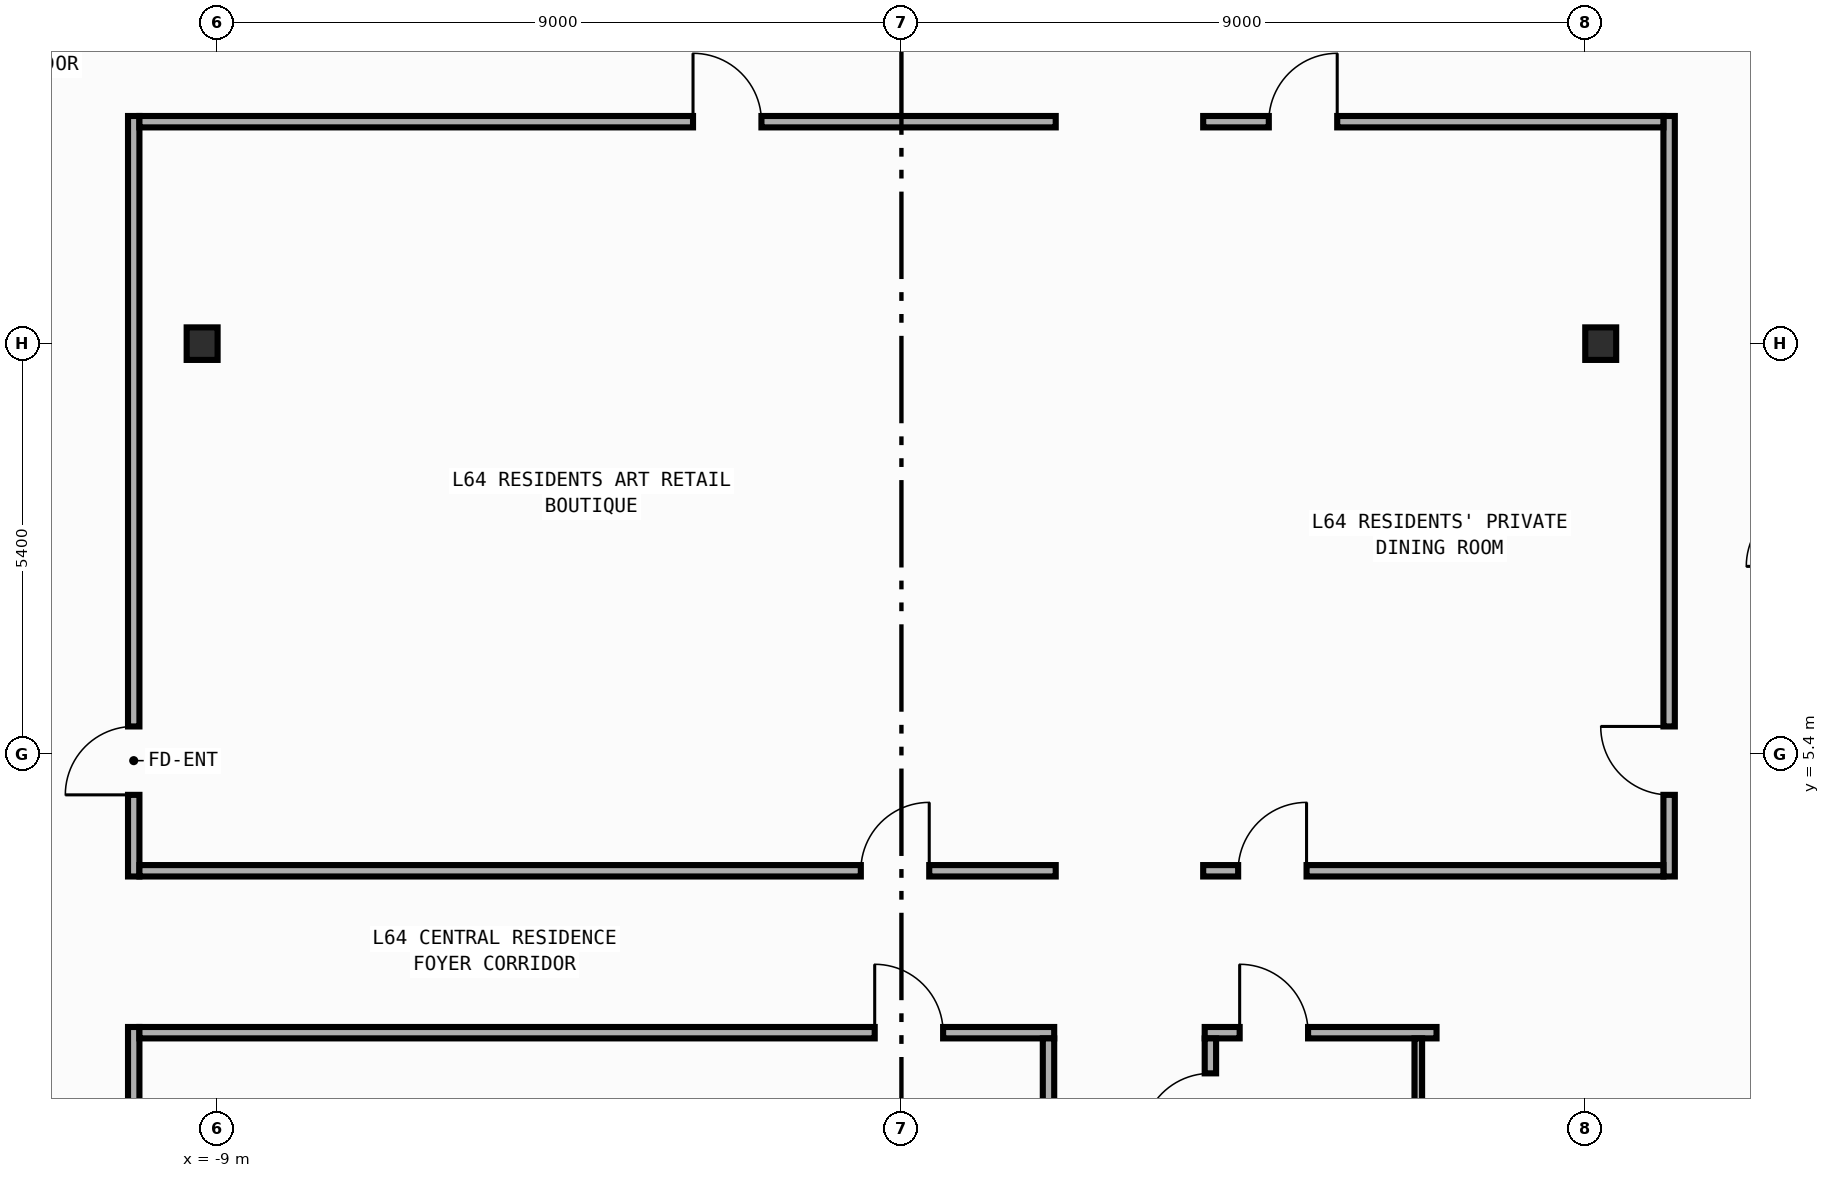
"""IFC4 building model, lengths in metres.
Left out: names, types, materials, properties, quantities, classifications, styles, units other than length and angle.
Written with IfcOpenShell. Run it as: python <this file> out.ifc"""

import sys

from ifc_helpers import new_model, si_unit, direction, frame, frame_2d, origin, origin_2d, place, context, subcontext, project, spatial, rectangle, i_section, extrude, element, fill, save


model = new_model("IFC4")
c1 = context("Model", 3, precision=1e-05, world=origin(), true_north=direction((0.0, 1.0)))
c2 = subcontext(c1, "Body", "Model", "MODEL_VIEW")
j1 = project(units=[si_unit("LENGTHUNIT", "METRE"), si_unit("PLANEANGLEUNIT", "RADIAN")], contexts=[c1])
p1 = place(None, origin())
s1 = spatial("IfcSite", under=j1, at=p1, CompositionType="ELEMENT")
p2 = place(p1, origin())
s2 = spatial("IfcBuilding", under=s1, at=p2, CompositionType="ELEMENT")
p3 = place(p2, frame((0.0, 0.0, 269.2)))
s3 = spatial("IfcBuildingStorey", under=s2, at=p3, CompositionType="ELEMENT", Elevation=269.2)
for number, where, z_axis, x_axis in (
    (1, (-9.2, 10.8, 0.0), (0.0, 0.0, 1.0), (1.0, 0.0, 0.0)),
    (2, (9.2, 10.8, 0.0), (0.0, 0.0, 1.0), (1.0, 0.0, 0.0)),
):
    element("IfcColumn", number, at=place(p3, frame(where, z_axis=z_axis, x_axis=x_axis)), inside=s3, PredefinedType="COLUMN", context=c2, shape_type="SweptSolid", body=[
        extrude(i_section(OverallWidth=0.407, OverallDepth=0.428, WebThickness=0.02, FlangeThickness=0.035, FilletRadius=0.022, at=origin_2d()), origin(), (0.0, 0.0, 1.0), 3.6),
    ])
p4 = place(p3, frame((-10.1, 3.79, 0.0), z_axis=(0.0, 0.0, 1.0), x_axis=(0.0, 1.0, 0.0)))
e3 = element("IfcWall", 3, at=p4, inside=s3, PredefinedType="PARTITIONING", context=c2, shape_type="SweptSolid", body=[
    extrude(rectangle(XDim=10.005, YDim=0.15, at=frame_2d((5.002, 0.0))), origin(), (0.0, 0.0, 1.0), 3.25),
])
p5 = place(p4, frame((1.074, 0.0, 0.0)))
e4 = element("IfcOpeningElement", 4, at=p5, cuts=e3, PredefinedType="OPENING", context=c2, shape_type="SweptSolid", body=[
    extrude(rectangle(XDim=0.9, YDim=2.15, at=frame_2d((0.45, 1.075))), frame((0.0, 0.085, 0.0), z_axis=(0.0, -1.0, 0.0), x_axis=(1.0, 0.0, 0.0)), (0.0, 0.0, 1.0), 0.17),
])
p6 = place(p3, frame((-10.1, -13.795, 0.0), z_axis=(0.0, 0.0, 1.0), x_axis=(0.0, 1.0, 0.0)))
e5 = element("IfcWall", 5, at=p6, inside=s3, PredefinedType="PARTITIONING", context=c2, shape_type="SweptSolid", body=[
    extrude(rectangle(XDim=15.605, YDim=0.15, at=frame_2d((7.802, 0.0))), origin(), (0.0, 0.0, 1.0), 3.25),
])
p7 = place(p6, frame((7.961, 0.0, 0.0)))
e6 = element("IfcOpeningElement", 6, at=p7, cuts=e5, PredefinedType="OPENING", context=c2, shape_type="SweptSolid", body=[
    extrude(rectangle(XDim=0.9, YDim=2.15, at=frame_2d((0.45, 1.075))), frame((0.0, 0.085, 0.0), z_axis=(0.0, -1.0, 0.0), x_axis=(1.0, 0.0, 0.0)), (0.0, 0.0, 1.0), 0.17),
])
p8 = place(p3, frame((10.1, 3.79, 0.0), z_axis=(0.0, 0.0, 1.0), x_axis=(0.0, 1.0, 0.0)))
e7 = element("IfcWall", 7, at=p8, inside=s3, PredefinedType="PARTITIONING", context=c2, shape_type="SweptSolid", body=[
    extrude(rectangle(XDim=10.005, YDim=0.15, at=frame_2d((5.002, 0.0))), origin(), (0.0, 0.0, 1.0), 3.25),
])
p9 = place(p8, frame((1.074, 0.0, 0.0)))
e8 = element("IfcOpeningElement", 8, at=p9, cuts=e7, PredefinedType="OPENING", context=c2, shape_type="SweptSolid", body=[
    extrude(rectangle(XDim=0.9, YDim=2.15, at=frame_2d((0.45, 1.075))), frame((0.0, 0.085, 0.0), z_axis=(0.0, -1.0, 0.0), x_axis=(1.0, 0.0, 0.0)), (0.0, 0.0, 1.0), 0.17),
])
p10 = place(p3, frame((-10.025, 3.865, 0.0), z_axis=(0.0, 0.0, 1.0), x_axis=(1.0, 0.0, 0.0)))
e9 = element("IfcWall", 9, at=p10, inside=s3, PredefinedType="PARTITIONING", context=c2, shape_type="SweptSolid", body=[
    extrude(rectangle(XDim=12.055, YDim=0.15, at=frame_2d((6.027, 0.0))), origin(), (0.0, 0.0, 1.0), 3.25),
])
p11 = place(p10, frame((9.491, 0.0, 0.0)))
e10 = element("IfcOpeningElement", 10, at=p11, cuts=e9, PredefinedType="OPENING", context=c2, shape_type="SweptSolid", body=[
    extrude(rectangle(XDim=0.9, YDim=2.15, at=frame_2d((0.45, 1.075))), frame((0.0, 0.085, 0.0), z_axis=(0.0, -1.0, 0.0), x_axis=(1.0, 0.0, 0.0)), (0.0, 0.0, 1.0), 0.17),
])
p12 = place(p3, frame((-10.025, 1.735, 0.0), z_axis=(0.0, 0.0, 1.0), x_axis=(1.0, 0.0, 0.0)))
e11 = element("IfcWall", 11, at=p12, inside=s3, PredefinedType="PARTITIONING", context=c2, shape_type="SweptSolid", body=[
    extrude(rectangle(XDim=12.035, YDim=0.15, at=frame_2d((6.018, 0.0))), origin(), (0.0, 0.0, 1.0), 3.25),
])
p13 = place(p12, frame((9.674, 0.0, 0.0)))
e12 = element("IfcOpeningElement", 12, at=p13, cuts=e11, PredefinedType="OPENING", context=c2, shape_type="SweptSolid", body=[
    extrude(rectangle(XDim=0.9, YDim=2.15, at=frame_2d((0.45, 1.075))), frame((0.0, 0.085, 0.0), z_axis=(0.0, -1.0, 0.0), x_axis=(1.0, 0.0, 0.0)), (0.0, 0.0, 1.0), 0.17),
])
p14 = place(p3, frame((3.97, 3.865, 0.0), z_axis=(0.0, 0.0, 1.0), x_axis=(1.0, 0.0, 0.0)))
e13 = element("IfcWall", 13, at=p14, inside=s3, PredefinedType="PARTITIONING", context=c2, shape_type="SweptSolid", body=[
    extrude(rectangle(XDim=6.055, YDim=0.15, at=frame_2d((3.027, 0.0))), origin(), (0.0, 0.0, 1.0), 3.25),
])
p15 = place(p14, frame((0.46, 0.0, 0.0)))
e14 = element("IfcOpeningElement", 14, at=p15, cuts=e13, PredefinedType="OPENING", context=c2, shape_type="SweptSolid", body=[
    extrude(rectangle(XDim=0.9, YDim=2.15, at=frame_2d((0.45, 1.075))), frame((0.0, 0.085, 0.0), z_axis=(0.0, -1.0, 0.0), x_axis=(1.0, 0.0, 0.0)), (0.0, 0.0, 1.0), 0.17),
])
p16 = place(p3, frame((3.99, 1.735, 0.0), z_axis=(0.0, 0.0, 1.0), x_axis=(1.0, 0.0, 0.0)))
e15 = element("IfcWall", 15, at=p16, inside=s3, PredefinedType="PARTITIONING", context=c2, shape_type="SweptSolid", body=[
    extrude(rectangle(XDim=3.05, YDim=0.15, at=frame_2d((1.525, 0.0))), origin(), (0.0, 0.0, 1.0), 3.25),
])
p17 = place(p16, frame((0.46, 0.0, 0.0)))
e16 = element("IfcOpeningElement", 16, at=p17, cuts=e15, PredefinedType="OPENING", context=c2, shape_type="SweptSolid", body=[
    extrude(rectangle(XDim=0.9, YDim=2.15, at=frame_2d((0.45, 1.075))), frame((0.0, 0.085, 0.0), z_axis=(0.0, -1.0, 0.0), x_axis=(1.0, 0.0, 0.0)), (0.0, 0.0, 1.0), 0.17),
])
p18 = place(p3, frame((1.935, -13.795, 0.0), z_axis=(0.0, 0.0, 1.0), x_axis=(0.0, 1.0, 0.0)))
e17 = element("IfcWall", 17, at=p18, inside=s3, PredefinedType="PARTITIONING", context=c2, shape_type="SweptSolid", body=[
    extrude(rectangle(XDim=15.455, YDim=0.15, at=frame_2d((7.728, 0.0))), origin(), (0.0, 0.0, 1.0), 3.25),
])
p19 = place(p18, frame((7.879, 0.0, 0.0)))
e18 = element("IfcOpeningElement", 18, at=p19, cuts=e17, PredefinedType="OPENING", context=c2, shape_type="SweptSolid", body=[
    extrude(rectangle(XDim=0.9, YDim=2.15, at=frame_2d((0.45, 1.075))), frame((0.0, 0.085, 0.0), z_axis=(0.0, -1.0, 0.0), x_axis=(1.0, 0.0, 0.0)), (0.0, 0.0, 1.0), 0.17),
])
p20 = place(p3, frame((4.065, -0.98, 0.0), z_axis=(0.0, 0.0, 1.0), x_axis=(0.0, 1.0, 0.0)))
e19 = element("IfcWall", 19, at=p20, inside=s3, PredefinedType="PARTITIONING", context=c2, shape_type="SweptSolid", body=[
    extrude(rectangle(XDim=2.64, YDim=0.15, at=frame_2d((1.32, 0.0))), origin(), (0.0, 0.0, 1.0), 3.25),
])
p21 = place(p20, frame((1.28, 0.0, 0.0)))
e20 = element("IfcOpeningElement", 20, at=p21, cuts=e19, PredefinedType="OPENING", context=c2, shape_type="SweptSolid", body=[
    extrude(rectangle(XDim=0.9, YDim=2.15, at=frame_2d((0.45, 1.075))), frame((0.0, 0.085, 0.0), z_axis=(0.0, -1.0, 0.0), x_axis=(1.0, 0.0, 0.0)), (0.0, 0.0, 1.0), 0.17),
])
p22 = place(p3, frame((-10.025, 13.72, 0.0), z_axis=(0.0, 0.0, 1.0), x_axis=(1.0, 0.0, 0.0)))
e21 = element("IfcWall", 21, at=p22, inside=s3, PredefinedType="PARTITIONING", context=c2, shape_type="SweptSolid", body=[
    extrude(rectangle(XDim=12.055, YDim=0.15, at=frame_2d((6.027, 0.0))), origin(), (0.0, 0.0, 1.0), 3.25),
])
p23 = place(p22, frame((7.283, 0.0, 0.0)))
e22 = element("IfcOpeningElement", 22, at=p23, cuts=e21, PredefinedType="OPENING", context=c2, shape_type="SweptSolid", body=[
    extrude(rectangle(XDim=0.9, YDim=2.15, at=frame_2d((0.45, 1.075))), frame((0.0, 0.085, 0.0), z_axis=(0.0, -1.0, 0.0), x_axis=(1.0, 0.0, 0.0)), (0.0, 0.0, 1.0), 0.17),
])
p24 = place(p3, frame((3.97, 13.72, 0.0), z_axis=(0.0, 0.0, 1.0), x_axis=(1.0, 0.0, 0.0)))
e23 = element("IfcWall", 23, at=p24, inside=s3, PredefinedType="PARTITIONING", context=c2, shape_type="SweptSolid", body=[
    extrude(rectangle(XDim=6.055, YDim=0.15, at=frame_2d((3.027, 0.0))), origin(), (0.0, 0.0, 1.0), 3.25),
])
p25 = place(p24, frame((0.863, 0.0, 0.0)))
e24 = element("IfcOpeningElement", 24, at=p25, cuts=e23, PredefinedType="OPENING", context=c2, shape_type="SweptSolid", body=[
    extrude(rectangle(XDim=0.9, YDim=2.15, at=frame_2d((0.45, 1.075))), frame((0.0, 0.085, 0.0), z_axis=(0.0, -1.0, 0.0), x_axis=(1.0, 0.0, 0.0)), (0.0, 0.0, 1.0), 0.17),
])
p26 = place(p3, frame((6.8, 1.66, 0.0), z_axis=(0.0, 0.0, 1.0), x_axis=(0.0, -1.0, 0.0)))
e25 = element("IfcWall", 25, at=p26, inside=s3, PredefinedType="PARTITIONING", context=c2, shape_type="SweptSolid", body=[
    extrude(rectangle(XDim=2.57, YDim=0.1, at=frame_2d((1.285, 0.0))), origin(), (0.0, 0.0, 1.0), 3.25),
])
p27 = place(p5, origin())
e26 = element("IfcDoor", 26, at=p27, inside=s3, OperationType="SINGLE_SWING_LEFT", PredefinedType="DOOR", context=c2, shape_type="SweptSolid", body=[
    extrude(rectangle(XDim=0.9, YDim=2.15, at=frame_2d((0.45, 1.075))), frame((0.0, 0.025, 0.0), z_axis=(0.0, -1.0, 0.0), x_axis=(1.0, 0.0, 0.0)), (0.0, 0.0, 1.0), 0.05),
])
fill(e4, e26)
p28 = place(p9, origin())
e27 = element("IfcDoor", 27, at=p28, inside=s3, OperationType="SINGLE_SWING_RIGHT", PredefinedType="DOOR", context=c2, shape_type="SweptSolid", body=[
    extrude(rectangle(XDim=0.9, YDim=2.15, at=frame_2d((0.45, 1.075))), frame((0.0, 0.025, 0.0), z_axis=(0.0, -1.0, 0.0), x_axis=(1.0, 0.0, 0.0)), (0.0, 0.0, 1.0), 0.05),
])
fill(e8, e27)
p29 = place(p11, origin())
e28 = element("IfcDoor", 28, at=p29, inside=s3, OperationType="SINGLE_SWING_RIGHT", PredefinedType="DOOR", context=c2, shape_type="SweptSolid", body=[
    extrude(rectangle(XDim=0.9, YDim=2.15, at=frame_2d((0.45, 1.075))), frame((0.0, 0.025, 0.0), z_axis=(0.0, -1.0, 0.0), x_axis=(1.0, 0.0, 0.0)), (0.0, 0.0, 1.0), 0.05),
])
fill(e10, e28)
p30 = place(p13, origin())
e29 = element("IfcDoor", 29, at=p30, inside=s3, OperationType="SINGLE_SWING_LEFT", PredefinedType="DOOR", context=c2, shape_type="SweptSolid", body=[
    extrude(rectangle(XDim=0.9, YDim=2.15, at=frame_2d((0.45, 1.075))), frame((0.0, 0.025, 0.0), z_axis=(0.0, -1.0, 0.0), x_axis=(1.0, 0.0, 0.0)), (0.0, 0.0, 1.0), 0.05),
])
fill(e12, e29)
p31 = place(p15, origin())
e30 = element("IfcDoor", 30, at=p31, inside=s3, OperationType="SINGLE_SWING_RIGHT", PredefinedType="DOOR", context=c2, shape_type="SweptSolid", body=[
    extrude(rectangle(XDim=0.9, YDim=2.15, at=frame_2d((0.45, 1.075))), frame((0.0, 0.025, 0.0), z_axis=(0.0, -1.0, 0.0), x_axis=(1.0, 0.0, 0.0)), (0.0, 0.0, 1.0), 0.05),
])
fill(e14, e30)
p32 = place(p17, origin())
e31 = element("IfcDoor", 31, at=p32, inside=s3, OperationType="SINGLE_SWING_LEFT", PredefinedType="DOOR", context=c2, shape_type="SweptSolid", body=[
    extrude(rectangle(XDim=0.9, YDim=2.15, at=frame_2d((0.45, 1.075))), frame((0.0, 0.025, 0.0), z_axis=(0.0, -1.0, 0.0), x_axis=(1.0, 0.0, 0.0)), (0.0, 0.0, 1.0), 0.05),
])
fill(e16, e31)
p33 = place(p21, origin())
e32 = element("IfcDoor", 32, at=p33, inside=s3, OperationType="SINGLE_SWING_LEFT", PredefinedType="DOOR", context=c2, shape_type="SweptSolid", body=[
    extrude(rectangle(XDim=0.9, YDim=2.15, at=frame_2d((0.45, 1.075))), frame((0.0, 0.025, 0.0), z_axis=(0.0, -1.0, 0.0), x_axis=(1.0, 0.0, 0.0)), (0.0, 0.0, 1.0), 0.05),
])
fill(e20, e32)
p34 = place(p23, origin())
e33 = element("IfcDoor", 33, at=p34, inside=s3, OperationType="SINGLE_SWING_LEFT", PredefinedType="DOOR", context=c2, shape_type="SweptSolid", body=[
    extrude(rectangle(XDim=0.9, YDim=2.15, at=frame_2d((0.45, 1.075))), frame((0.0, 0.025, 0.0), z_axis=(0.0, -1.0, 0.0), x_axis=(1.0, 0.0, 0.0)), (0.0, 0.0, 1.0), 0.05),
])
fill(e22, e33)
p35 = place(p25, origin())
e34 = element("IfcDoor", 34, at=p35, inside=s3, OperationType="SINGLE_SWING_RIGHT", PredefinedType="DOOR", context=c2, shape_type="SweptSolid", body=[
    extrude(rectangle(XDim=0.9, YDim=2.15, at=frame_2d((0.45, 1.075))), frame((0.0, 0.025, 0.0), z_axis=(0.0, -1.0, 0.0), x_axis=(1.0, 0.0, 0.0)), (0.0, 0.0, 1.0), 0.05),
])
fill(e24, e34)
save(model, sys.argv[1])
